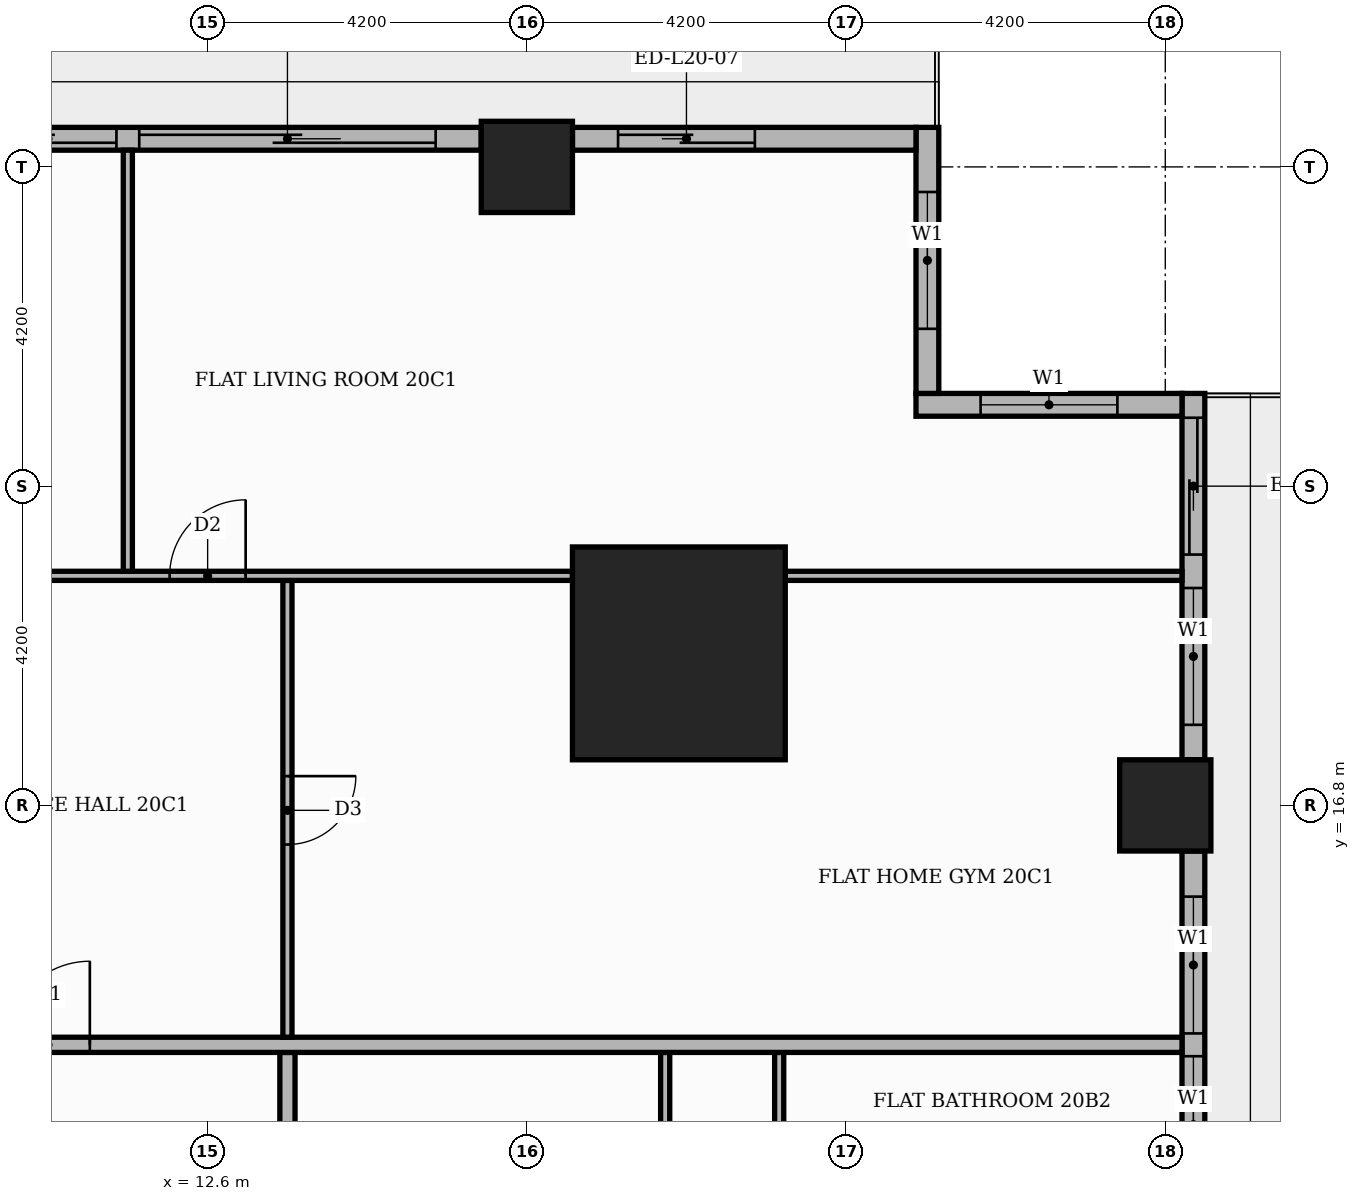
"""IFC4 building model, lengths in metres.
Left out: names, types, materials, properties, quantities, classifications, styles, units other than length and angle.
Written with IfcOpenShell. Run it as: python <this file> out.ifc"""

import sys

from ifc_helpers import new_model, si_unit, direction, frame, frame_2d, origin, origin_2d, place, context, subcontext, project, spatial, rectangle, extrude, element, fill, save


model = new_model("IFC4")
c1 = context("Model", 3, precision=1e-05, world=origin(), true_north=direction((0.0, 1.0)))
c2 = subcontext(c1, "Body", "Model", "MODEL_VIEW")
j1 = project(units=[si_unit("LENGTHUNIT", "METRE"), si_unit("PLANEANGLEUNIT", "RADIAN")], contexts=[c1])
p1 = place(None, origin())
s1 = spatial("IfcSite", under=j1, at=p1, CompositionType="ELEMENT")
p2 = place(p1, origin())
s2 = spatial("IfcBuilding", under=s1, at=p2, CompositionType="ELEMENT")
p3 = place(p2, frame((0.0, 0.0, 87.0)))
s3 = spatial("IfcBuildingStorey", under=s2, at=p3, CompositionType="ELEMENT", Elevation=87.0)
p4 = place(p3, frame((18.8, 18.8, 0.0), z_axis=(0.0, 0.0, 1.0), x_axis=(1.0, 0.0, 0.0)))
e1 = element("IfcColumn", 1, at=p4, inside=s3, PredefinedType="COLUMN", context=c2, shape_type="SweptSolid", body=[
    extrude(rectangle(XDim=2.8, YDim=2.8, at=origin_2d()), origin(), (0.0, 0.0, 1.0), 3.9),
])
for number, where, z_axis, x_axis in (
    (2, (25.2, 16.8, 0.0), (0.0, 0.0, 1.0), (1.0, 0.0, 0.0)),
    (3, (16.8, 25.2, 0.0), (0.0, 0.0, 1.0), (1.0, 0.0, 0.0)),
):
    element("IfcColumn", number, at=place(p3, frame(where, z_axis=z_axis, x_axis=x_axis)), inside=s3, PredefinedType="COLUMN", context=c2, shape_type="SweptSolid", body=[
        extrude(rectangle(XDim=1.2, YDim=1.2, at=origin_2d()), origin(), (0.0, 0.0, 1.0), 3.9),
    ])
p5 = place(p3, frame((25.57, 9.0, 0.0), z_axis=(0.0, 0.0, 1.0), x_axis=(0.0, 1.0, 0.0)))
e4 = element("IfcWall", 4, at=p5, inside=s3, PredefinedType="STANDARD", context=c2, shape_type="SweptSolid", body=[
    extrude(rectangle(XDim=7.2, YDim=0.3, at=frame_2d((3.6, 0.0))), origin(), (0.0, 0.0, 1.0), 3.48),
])
p6 = place(p5, frame((0.6, 0.0, 0.9)))
e5 = element("IfcOpeningElement", 5, at=p6, cuts=e4, PredefinedType="OPENING", context=c2, shape_type="SweptSolid", body=[
    extrude(rectangle(XDim=1.8, YDim=2.1, at=frame_2d((0.9, 1.05))), frame((0.0, 0.16, 0.0), z_axis=(0.0, -1.0, 0.0), x_axis=(1.0, 0.0, 0.0)), (0.0, 0.0, 1.0), 0.32),
])
p7 = place(p5, frame((2.7, 0.0, 0.9)))
e6 = element("IfcOpeningElement", 6, at=p7, cuts=e4, PredefinedType="OPENING", context=c2, shape_type="SweptSolid", body=[
    extrude(rectangle(XDim=1.8, YDim=2.1, at=frame_2d((0.9, 1.05))), frame((0.0, 0.16, 0.0), z_axis=(0.0, -1.0, 0.0), x_axis=(1.0, 0.0, 0.0)), (0.0, 0.0, 1.0), 0.32),
])
p8 = place(p5, frame((4.8, 0.0, 0.9)))
e7 = element("IfcOpeningElement", 7, at=p8, cuts=e4, PredefinedType="OPENING", context=c2, shape_type="SweptSolid", body=[
    extrude(rectangle(XDim=1.8, YDim=2.1, at=frame_2d((0.9, 1.05))), frame((0.0, 0.16, 0.0), z_axis=(0.0, -1.0, 0.0), x_axis=(1.0, 0.0, 0.0)), (0.0, 0.0, 1.0), 0.32),
])
p9 = place(p3, frame((25.57, 17.4, 0.0), z_axis=(0.0, 0.0, 1.0), x_axis=(0.0, 1.0, 0.0)))
e8 = element("IfcWall", 8, at=p9, inside=s3, PredefinedType="STANDARD", context=c2, shape_type="SweptSolid", body=[
    extrude(rectangle(XDim=4.82, YDim=0.3, at=frame_2d((2.41, 0.0))), origin(), (0.0, 0.0, 1.0), 3.48),
])
p10 = place(p9, frame((2.7, 0.0, 0.0)))
e9 = element("IfcOpeningElement", 9, at=p10, cuts=e8, PredefinedType="OPENING", context=c2, shape_type="SweptSolid", body=[
    extrude(rectangle(XDim=1.8, YDim=2.4, at=frame_2d((0.9, 1.2))), frame((0.0, 0.16, 0.0), z_axis=(0.0, -1.0, 0.0), x_axis=(1.0, 0.0, 0.0)), (0.0, 0.0, 1.0), 0.32),
])
p11 = place(p9, frame((0.46, 0.0, 0.9)))
e10 = element("IfcOpeningElement", 10, at=p11, cuts=e8, PredefinedType="OPENING", context=c2, shape_type="SweptSolid", body=[
    extrude(rectangle(XDim=1.8, YDim=2.1, at=frame_2d((0.9, 1.05))), frame((0.0, 0.16, 0.0), z_axis=(0.0, -1.0, 0.0), x_axis=(1.0, 0.0, 0.0)), (0.0, 0.0, 1.0), 0.32),
])
p12 = place(p3, frame((25.42, 22.07, 0.0), z_axis=(0.0, 0.0, 1.0), x_axis=(-1.0, 0.0, 0.0)))
e11 = element("IfcWall", 11, at=p12, inside=s3, PredefinedType="STANDARD", context=c2, shape_type="SweptSolid", body=[
    extrude(rectangle(XDim=3.5, YDim=0.3, at=frame_2d((1.75, 0.0))), origin(), (0.0, 0.0, 1.0), 3.48),
])
p13 = place(p12, frame((0.85, 0.0, 0.9)))
e12 = element("IfcOpeningElement", 12, at=p13, cuts=e11, PredefinedType="OPENING", context=c2, shape_type="SweptSolid", body=[
    extrude(rectangle(XDim=1.8, YDim=2.1, at=frame_2d((0.9, 1.05))), frame((0.0, 0.16, 0.0), z_axis=(0.0, -1.0, 0.0), x_axis=(1.0, 0.0, 0.0)), (0.0, 0.0, 1.0), 0.32),
])
p14 = place(p3, frame((22.07, 22.22, 0.0), z_axis=(0.0, 0.0, 1.0), x_axis=(0.0, 1.0, 0.0)))
e13 = element("IfcWall", 13, at=p14, inside=s3, PredefinedType="STANDARD", context=c2, shape_type="SweptSolid", body=[
    extrude(rectangle(XDim=3.5, YDim=0.3, at=frame_2d((1.75, 0.0))), origin(), (0.0, 0.0, 1.0), 3.48),
])
p15 = place(p14, frame((0.85, 0.0, 0.9)))
e14 = element("IfcOpeningElement", 14, at=p15, cuts=e13, PredefinedType="OPENING", context=c2, shape_type="SweptSolid", body=[
    extrude(rectangle(XDim=1.8, YDim=2.1, at=frame_2d((0.9, 1.05))), frame((0.0, 0.16, 0.0), z_axis=(0.0, -1.0, 0.0), x_axis=(1.0, 0.0, 0.0)), (0.0, 0.0, 1.0), 0.32),
])
p16 = place(p3, frame((21.92, 25.57, 0.0), z_axis=(0.0, 0.0, 1.0), x_axis=(-1.0, 0.0, 0.0)))
e15 = element("IfcWall", 15, at=p16, inside=s3, PredefinedType="STANDARD", context=c2, shape_type="SweptSolid", body=[
    extrude(rectangle(XDim=4.52, YDim=0.3, at=frame_2d((2.26, 0.0))), origin(), (0.0, 0.0, 1.0), 3.48),
])
p17 = place(p16, frame((2.12, 0.0, 0.0)))
e16 = element("IfcOpeningElement", 16, at=p17, cuts=e15, PredefinedType="OPENING", context=c2, shape_type="SweptSolid", body=[
    extrude(rectangle(XDim=1.8, YDim=2.4, at=frame_2d((0.9, 1.2))), frame((0.0, 0.16, 0.0), z_axis=(0.0, -1.0, 0.0), x_axis=(1.0, 0.0, 0.0)), (0.0, 0.0, 1.0), 0.32),
])
p18 = place(p3, frame((16.2, 25.57, 0.0), z_axis=(0.0, 0.0, 1.0), x_axis=(-1.0, 0.0, 0.0)))
e17 = element("IfcWall", 17, at=p18, inside=s3, PredefinedType="STANDARD", context=c2, shape_type="SweptSolid", body=[
    extrude(rectangle(XDim=7.2, YDim=0.3, at=frame_2d((3.6, 0.0))), origin(), (0.0, 0.0, 1.0), 3.48),
])
p19 = place(p18, frame((0.6, 0.0, 0.0)))
e18 = element("IfcOpeningElement", 18, at=p19, cuts=e17, PredefinedType="OPENING", context=c2, shape_type="SweptSolid", body=[
    extrude(rectangle(XDim=3.9, YDim=2.4, at=frame_2d((1.95, 1.2))), frame((0.0, 0.16, 0.0), z_axis=(0.0, -1.0, 0.0), x_axis=(1.0, 0.0, 0.0)), (0.0, 0.0, 1.0), 0.32),
])
p20 = place(p18, frame((4.8, 0.0, 0.0)))
e19 = element("IfcOpeningElement", 19, at=p20, cuts=e17, PredefinedType="OPENING", context=c2, shape_type="SweptSolid", body=[
    extrude(rectangle(XDim=1.8, YDim=2.4, at=frame_2d((0.9, 1.2))), frame((0.0, 0.16, 0.0), z_axis=(0.0, -1.0, 0.0), x_axis=(1.0, 0.0, 0.0)), (0.0, 0.0, 1.0), 0.32),
])
p21 = place(p3, frame((13.65, -5.15, 0.0), z_axis=(0.0, 0.0, 1.0), x_axis=(0.0, 1.0, 0.0)))
e20 = element("IfcWall", 20, at=p21, inside=s3, PredefinedType="PARTITIONING", context=c2, shape_type="SweptSolid", body=[
    extrude(rectangle(XDim=18.7, YDim=0.2, at=frame_2d((9.35, 0.0))), origin(), (0.0, 0.0, 1.0), 3.48),
])
p22 = place(p21, frame((3.55, 0.0, 0.0)))
e21 = element("IfcOpeningElement", 21, at=p22, cuts=e20, PredefinedType="OPENING", context=c2, shape_type="SweptSolid", body=[
    extrude(rectangle(XDim=1.1, YDim=2.4, at=frame_2d((0.55, 1.2))), frame((0.0, 0.11, 0.0), z_axis=(0.0, -1.0, 0.0), x_axis=(1.0, 0.0, 0.0)), (0.0, 0.0, 1.0), 0.22),
])
p23 = place(p3, frame((18.62, 10.26, 0.0), z_axis=(0.0, 0.0, 1.0), x_axis=(0.0, 1.0, 0.0)))
e22 = element("IfcWall", 22, at=p23, inside=s3, PredefinedType="PARTITIONING", context=c2, shape_type="SweptSolid", body=[
    extrude(rectangle(XDim=3.29, YDim=0.12, at=frame_2d((1.645, 0.0))), origin(), (0.0, 0.0, 1.0), 3.48),
])
p24 = place(p23, frame((1.215, 0.0, 0.0)))
e23 = element("IfcOpeningElement", 23, at=p24, cuts=e22, PredefinedType="OPENING", context=c2, shape_type="SweptSolid", body=[
    extrude(rectangle(XDim=0.9, YDim=2.1, at=frame_2d((0.45, 1.05))), frame((0.0, 0.07, 0.0), z_axis=(0.0, -1.0, 0.0), x_axis=(1.0, 0.0, 0.0)), (0.0, 0.0, 1.0), 0.14),
])
p25 = place(p3, frame((20.12, 11.61, 0.0), z_axis=(0.0, 0.0, 1.0), x_axis=(0.0, 1.0, 0.0)))
e24 = element("IfcWall", 24, at=p25, inside=s3, PredefinedType="PARTITIONING", context=c2, shape_type="SweptSolid", body=[
    extrude(rectangle(XDim=1.94, YDim=0.12, at=frame_2d((0.97, 0.0))), origin(), (0.0, 0.0, 1.0), 3.48),
])
p26 = place(p3, frame((-13.65, 13.65, 0.0), z_axis=(0.0, 0.0, 1.0), x_axis=(1.0, 0.0, 0.0)))
e25 = element("IfcWall", 25, at=p26, inside=s3, PredefinedType="PARTITIONING", context=c2, shape_type="SweptSolid", body=[
    extrude(rectangle(XDim=39.07, YDim=0.2, at=frame_2d((19.535, 0.0))), origin(), (0.0, 0.0, 1.0), 3.48),
])
p27 = place(p26, frame((23.6, 0.0, 0.0)))
e26 = element("IfcOpeningElement", 26, at=p27, cuts=e25, PredefinedType="OPENING", context=c2, shape_type="SweptSolid", body=[
    extrude(rectangle(XDim=1.1, YDim=2.4, at=frame_2d((0.55, 1.2))), frame((0.0, 0.11, 0.0), z_axis=(0.0, -1.0, 0.0), x_axis=(1.0, 0.0, 0.0)), (0.0, 0.0, 1.0), 0.22),
])
p28 = place(p3, frame((13.65, 13.75, 0.0), z_axis=(0.0, 0.0, 1.0), x_axis=(0.0, 1.0, 0.0)))
e27 = element("IfcWall", 27, at=p28, inside=s3, PredefinedType="PARTITIONING", context=c2, shape_type="SweptSolid", body=[
    extrude(rectangle(XDim=6.01, YDim=0.12, at=frame_2d((3.005, 0.0))), origin(), (0.0, 0.0, 1.0), 3.48),
])
p29 = place(p28, frame((2.535, 0.0, 0.0)))
e28 = element("IfcOpeningElement", 28, at=p29, cuts=e27, PredefinedType="OPENING", context=c2, shape_type="SweptSolid", body=[
    extrude(rectangle(XDim=0.9, YDim=2.1, at=frame_2d((0.45, 1.05))), frame((0.0, 0.07, 0.0), z_axis=(0.0, -1.0, 0.0), x_axis=(1.0, 0.0, 0.0)), (0.0, 0.0, 1.0), 0.14),
])
p30 = place(p3, frame((-13.55, 19.82, 0.0), z_axis=(0.0, 0.0, 1.0), x_axis=(1.0, 0.0, 0.0)))
e29 = element("IfcWall", 29, at=p30, inside=s3, PredefinedType="PARTITIONING", context=c2, shape_type="SweptSolid", body=[
    extrude(rectangle(XDim=30.95, YDim=0.12, at=frame_2d((15.475, 0.0))), origin(), (0.0, 0.0, 1.0), 3.48),
])
p31 = place(p30, frame((25.65, 0.0, 0.0)))
e30 = element("IfcOpeningElement", 30, at=p31, cuts=e29, PredefinedType="OPENING", context=c2, shape_type="SweptSolid", body=[
    extrude(rectangle(XDim=1.0, YDim=2.1, at=frame_2d((0.5, 1.05))), frame((0.0, 0.07, 0.0), z_axis=(0.0, -1.0, 0.0), x_axis=(1.0, 0.0, 0.0)), (0.0, 0.0, 1.0), 0.14),
])
p32 = place(p30, frame((20.4, 0.0, 0.0)))
e31 = element("IfcOpeningElement", 31, at=p32, cuts=e29, PredefinedType="OPENING", context=c2, shape_type="SweptSolid", body=[
    extrude(rectangle(XDim=1.0, YDim=2.1, at=frame_2d((0.5, 1.05))), frame((0.0, 0.07, 0.0), z_axis=(0.0, -1.0, 0.0), x_axis=(1.0, 0.0, 0.0)), (0.0, 0.0, 1.0), 0.14),
])
p33 = place(p30, frame((13.1, 0.0, 0.0)))
e32 = element("IfcOpeningElement", 32, at=p33, cuts=e29, PredefinedType="OPENING", context=c2, shape_type="SweptSolid", body=[
    extrude(rectangle(XDim=0.9, YDim=2.1, at=frame_2d((0.45, 1.05))), frame((0.0, 0.07, 0.0), z_axis=(0.0, -1.0, 0.0), x_axis=(1.0, 0.0, 0.0)), (0.0, 0.0, 1.0), 0.14),
])
p34 = place(p30, frame((3.65, 0.0, 0.0)))
e33 = element("IfcOpeningElement", 33, at=p34, cuts=e29, PredefinedType="OPENING", context=c2, shape_type="SweptSolid", body=[
    extrude(rectangle(XDim=0.9, YDim=2.1, at=frame_2d((0.45, 1.05))), frame((0.0, 0.07, 0.0), z_axis=(0.0, -1.0, 0.0), x_axis=(1.0, 0.0, 0.0)), (0.0, 0.0, 1.0), 0.14),
])
p35 = place(p3, frame((20.2, 19.82, 0.0), z_axis=(0.0, 0.0, 1.0), x_axis=(1.0, 0.0, 0.0)))
e34 = element("IfcWall", 34, at=p35, inside=s3, PredefinedType="PARTITIONING", context=c2, shape_type="SweptSolid", body=[
    extrude(rectangle(XDim=5.22, YDim=0.12, at=frame_2d((2.61, 0.0))), origin(), (0.0, 0.0, 1.0), 3.48),
])
p36 = place(p3, frame((11.55, 19.88, 0.0), z_axis=(0.0, 0.0, 1.0), x_axis=(0.0, 1.0, 0.0)))
e35 = element("IfcWall", 35, at=p36, inside=s3, PredefinedType="PARTITIONING", context=c2, shape_type="SweptSolid", body=[
    extrude(rectangle(XDim=5.54, YDim=0.12, at=frame_2d((2.77, 0.0))), origin(), (0.0, 0.0, 1.0), 3.48),
])
p37 = place(p7, origin())
e36 = element("IfcWindow", 36, at=p37, inside=s3, PartitioningType="SINGLE_PANEL", PredefinedType="WINDOW", context=c2, shape_type="SweptSolid", body=[
    extrude(rectangle(XDim=1.8, YDim=2.1, at=frame_2d((0.9, 1.05))), frame((0.0, 0.03, 0.0), z_axis=(0.0, -1.0, 0.0), x_axis=(1.0, 0.0, 0.0)), (0.0, 0.0, 1.0), 0.06),
])
fill(e6, e36)
p38 = place(p8, origin())
e37 = element("IfcWindow", 37, at=p38, inside=s3, PartitioningType="SINGLE_PANEL", PredefinedType="WINDOW", context=c2, shape_type="SweptSolid", body=[
    extrude(rectangle(XDim=1.8, YDim=2.1, at=frame_2d((0.9, 1.05))), frame((0.0, 0.03, 0.0), z_axis=(0.0, -1.0, 0.0), x_axis=(1.0, 0.0, 0.0)), (0.0, 0.0, 1.0), 0.06),
])
fill(e7, e37)
p39 = place(p10, origin())
e38 = element("IfcDoor", 38, at=p39, inside=s3, OperationType="SLIDING_TO_LEFT", PredefinedType="DOOR", context=c2, shape_type="SweptSolid", body=[
    extrude(rectangle(XDim=1.8, YDim=2.4, at=frame_2d((0.9, 1.2))), frame((0.0, 0.025, 0.0), z_axis=(0.0, -1.0, 0.0), x_axis=(1.0, 0.0, 0.0)), (0.0, 0.0, 1.0), 0.05),
])
fill(e9, e38)
p40 = place(p11, origin())
e39 = element("IfcWindow", 39, at=p40, inside=s3, PartitioningType="SINGLE_PANEL", PredefinedType="WINDOW", context=c2, shape_type="SweptSolid", body=[
    extrude(rectangle(XDim=1.8, YDim=2.1, at=frame_2d((0.9, 1.05))), frame((0.0, 0.03, 0.0), z_axis=(0.0, -1.0, 0.0), x_axis=(1.0, 0.0, 0.0)), (0.0, 0.0, 1.0), 0.06),
])
fill(e10, e39)
p41 = place(p13, origin())
e40 = element("IfcWindow", 40, at=p41, inside=s3, PartitioningType="SINGLE_PANEL", PredefinedType="WINDOW", context=c2, shape_type="SweptSolid", body=[
    extrude(rectangle(XDim=1.8, YDim=2.1, at=frame_2d((0.9, 1.05))), frame((0.0, 0.03, 0.0), z_axis=(0.0, -1.0, 0.0), x_axis=(1.0, 0.0, 0.0)), (0.0, 0.0, 1.0), 0.06),
])
fill(e12, e40)
p42 = place(p15, origin())
e41 = element("IfcWindow", 41, at=p42, inside=s3, PartitioningType="SINGLE_PANEL", PredefinedType="WINDOW", context=c2, shape_type="SweptSolid", body=[
    extrude(rectangle(XDim=1.8, YDim=2.1, at=frame_2d((0.9, 1.05))), frame((0.0, 0.03, 0.0), z_axis=(0.0, -1.0, 0.0), x_axis=(1.0, 0.0, 0.0)), (0.0, 0.0, 1.0), 0.06),
])
fill(e14, e41)
p43 = place(p17, origin())
e42 = element("IfcDoor", 42, at=p43, inside=s3, OperationType="SLIDING_TO_RIGHT", PredefinedType="DOOR", context=c2, shape_type="SweptSolid", body=[
    extrude(rectangle(XDim=1.8, YDim=2.4, at=frame_2d((0.9, 1.2))), frame((0.0, 0.025, 0.0), z_axis=(0.0, -1.0, 0.0), x_axis=(1.0, 0.0, 0.0)), (0.0, 0.0, 1.0), 0.05),
])
fill(e16, e42)
p44 = place(p19, origin())
e43 = element("IfcDoor", 43, at=p44, inside=s3, OperationType="SLIDING_TO_LEFT", PredefinedType="DOOR", context=c2, shape_type="SweptSolid", body=[
    extrude(rectangle(XDim=3.9, YDim=2.4, at=frame_2d((1.95, 1.2))), frame((0.0, 0.025, 0.0), z_axis=(0.0, -1.0, 0.0), x_axis=(1.0, 0.0, 0.0)), (0.0, 0.0, 1.0), 0.05),
])
fill(e18, e43)
p45 = place(p20, origin())
e44 = element("IfcDoor", 44, at=p45, inside=s3, OperationType="SLIDING_TO_RIGHT", PredefinedType="DOOR", context=c2, shape_type="SweptSolid", body=[
    extrude(rectangle(XDim=1.8, YDim=2.4, at=frame_2d((0.9, 1.2))), frame((0.0, 0.025, 0.0), z_axis=(0.0, -1.0, 0.0), x_axis=(1.0, 0.0, 0.0)), (0.0, 0.0, 1.0), 0.05),
])
fill(e19, e44)
p46 = place(p27, origin())
e45 = element("IfcDoor", 45, at=p46, inside=s3, OperationType="SINGLE_SWING_RIGHT", PredefinedType="DOOR", context=c2, shape_type="SweptSolid", body=[
    extrude(rectangle(XDim=1.1, YDim=2.4, at=frame_2d((0.55, 1.2))), frame((0.0, 0.025, 0.0), z_axis=(0.0, -1.0, 0.0), x_axis=(1.0, 0.0, 0.0)), (0.0, 0.0, 1.0), 0.05),
])
fill(e26, e45)
p47 = place(p29, frame((0.9, 0.0, 0.0), z_axis=(0.0, 0.0, 1.0), x_axis=(-1.0, 0.0, 0.0)))
e46 = element("IfcDoor", 46, at=p47, inside=s3, OperationType="SINGLE_SWING_RIGHT", PredefinedType="DOOR", context=c2, shape_type="SweptSolid", body=[
    extrude(rectangle(XDim=0.9, YDim=2.1, at=frame_2d((0.45, 1.05))), frame((0.0, 0.025, 0.0), z_axis=(0.0, -1.0, 0.0), x_axis=(1.0, 0.0, 0.0)), (0.0, 0.0, 1.0), 0.05),
])
fill(e28, e46)
p48 = place(p31, origin())
e47 = element("IfcDoor", 47, at=p48, inside=s3, OperationType="SINGLE_SWING_RIGHT", PredefinedType="DOOR", context=c2, shape_type="SweptSolid", body=[
    extrude(rectangle(XDim=1.0, YDim=2.1, at=frame_2d((0.5, 1.05))), frame((0.0, 0.025, 0.0), z_axis=(0.0, -1.0, 0.0), x_axis=(1.0, 0.0, 0.0)), (0.0, 0.0, 1.0), 0.05),
])
fill(e30, e47)
save(model, sys.argv[1])
